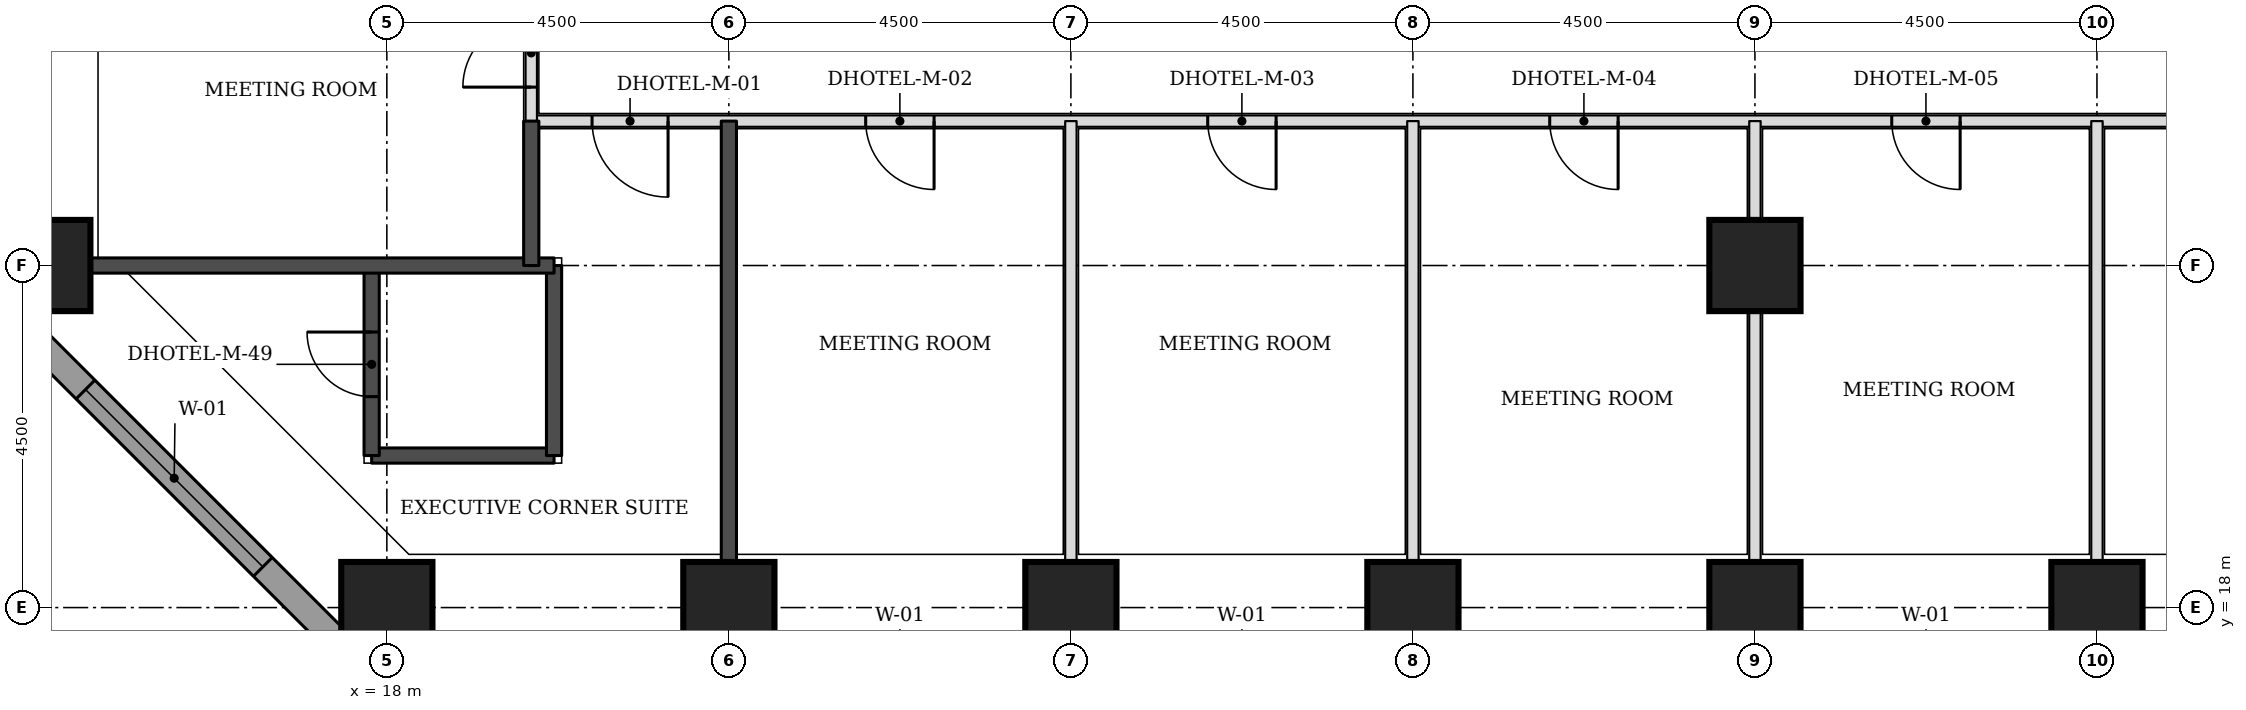
"""IFC4 building model, lengths in metres.
Left out: names, types, materials, properties, quantities, classifications, styles, units other than length and angle.
Written with IfcOpenShell. Run it as: python <this file> out.ifc"""

import sys

from ifc_helpers import new_model, si_unit, direction, frame, frame_2d, origin, origin_2d, place, context, subcontext, project, spatial, rectangle, extrude, element, fill, save


model = new_model("IFC4")
c1 = context("Model", 3, precision=1e-05, world=origin(), true_north=direction((0.0, 1.0)))
c2 = subcontext(c1, "Body", "Model", "MODEL_VIEW")
j1 = project(units=[si_unit("LENGTHUNIT", "METRE"), si_unit("PLANEANGLEUNIT", "RADIAN")], contexts=[c1])
p1 = place(None, origin())
s1 = spatial("IfcSite", under=j1, at=p1, CompositionType="ELEMENT")
p2 = place(p1, origin())
s2 = spatial("IfcBuilding", under=s1, at=p2, CompositionType="ELEMENT")
p3 = place(p2, frame((0.0, 0.0, 23.1)))
s3 = spatial("IfcBuildingStorey", under=s2, at=p3, CompositionType="ELEMENT", Elevation=23.1)
for number, where, z_axis, x_axis in (
    (1, (18.0, 18.0, 0.0), (0.0, 0.0, 1.0), (1.0, 0.0, 0.0)),
    (2, (22.5, 18.0, 0.0), (0.0, 0.0, 1.0), (1.0, 0.0, 0.0)),
    (3, (27.0, 18.0, 0.0), (0.0, 0.0, 1.0), (1.0, 0.0, 0.0)),
    (4, (31.5, 18.0, 0.0), (0.0, 0.0, 1.0), (1.0, 0.0, 0.0)),
    (5, (36.0, 18.0, 0.0), (0.0, 0.0, 1.0), (1.0, 0.0, 0.0)),
    (6, (40.5, 18.0, 0.0), (0.0, 0.0, 1.0), (1.0, 0.0, 0.0)),
    (7, (13.5, 22.5, 0.0), (0.0, 0.0, 1.0), (1.0, 0.0, 0.0)),
    (8, (36.0, 22.5, 0.0), (0.0, 0.0, 1.0), (1.0, 0.0, 0.0)),
):
    element("IfcColumn", number, at=place(p3, frame(where, z_axis=z_axis, x_axis=x_axis)), inside=s3, PredefinedType="COLUMN", context=c2, shape_type="SweptSolid", body=[
        extrude(rectangle(XDim=1.2, YDim=1.2, at=origin_2d()), origin(), (0.0, 0.0, 1.0), 3.3),
    ])
p4 = place(p3, frame((12.674, 22.23, 0.0), z_axis=(0.0, 0.0, 1.0), x_axis=(0.707106781187, -0.707106781187, 0.0)))
e9 = element("IfcWall", 9, at=p4, inside=s3, PredefinedType="STANDARD", context=c2, shape_type="SweptSolid", body=[
    extrude(rectangle(XDim=7.151, YDim=0.35, at=frame_2d((3.576, 0.0))), origin(), (0.0, 0.0, 1.0), 3.055),
])
p5 = place(p4, frame((1.926, 0.0, 0.8)))
e10 = element("IfcOpeningElement", 10, at=p5, cuts=e9, PredefinedType="OPENING", context=c2, shape_type="SweptSolid", body=[
    extrude(rectangle(XDim=3.3, YDim=1.5, at=frame_2d((1.65, 0.75))), frame((0.0, 0.185, 0.0), z_axis=(0.0, -1.0, 0.0), x_axis=(1.0, 0.0, 0.0)), (0.0, 0.0, 1.0), 0.37),
])
p6 = place(p3, frame((19.9, 24.4, 0.0), z_axis=(0.0, 0.0, 1.0), x_axis=(1.0, 0.0, 0.0)))
e11 = element("IfcWall", 11, at=p6, inside=s3, PredefinedType="PARTITIONING", context=c2, shape_type="SweptSolid", body=[
    extrude(rectangle(XDim=32.2, YDim=0.15, at=frame_2d((16.1, 0.0))), origin(), (0.0, 0.0, 1.0), 3.08),
])
p7 = place(p6, frame((4.4, 0.0, 0.0)))
e12 = element("IfcOpeningElement", 12, at=p7, cuts=e11, PredefinedType="OPENING", context=c2, shape_type="SweptSolid", body=[
    extrude(rectangle(XDim=0.9, YDim=2.1, at=frame_2d((0.45, 1.05))), frame((0.0, 0.085, 0.0), z_axis=(0.0, -1.0, 0.0), x_axis=(1.0, 0.0, 0.0)), (0.0, 0.0, 1.0), 0.17),
])
p8 = place(p6, frame((8.9, 0.0, 0.0)))
e13 = element("IfcOpeningElement", 13, at=p8, cuts=e11, PredefinedType="OPENING", context=c2, shape_type="SweptSolid", body=[
    extrude(rectangle(XDim=0.9, YDim=2.1, at=frame_2d((0.45, 1.05))), frame((0.0, 0.085, 0.0), z_axis=(0.0, -1.0, 0.0), x_axis=(1.0, 0.0, 0.0)), (0.0, 0.0, 1.0), 0.17),
])
p9 = place(p6, frame((13.4, 0.0, 0.0)))
e14 = element("IfcOpeningElement", 14, at=p9, cuts=e11, PredefinedType="OPENING", context=c2, shape_type="SweptSolid", body=[
    extrude(rectangle(XDim=0.9, YDim=2.1, at=frame_2d((0.45, 1.05))), frame((0.0, 0.085, 0.0), z_axis=(0.0, -1.0, 0.0), x_axis=(1.0, 0.0, 0.0)), (0.0, 0.0, 1.0), 0.17),
])
p10 = place(p6, frame((17.9, 0.0, 0.0)))
e15 = element("IfcOpeningElement", 15, at=p10, cuts=e11, PredefinedType="OPENING", context=c2, shape_type="SweptSolid", body=[
    extrude(rectangle(XDim=0.9, YDim=2.1, at=frame_2d((0.45, 1.05))), frame((0.0, 0.085, 0.0), z_axis=(0.0, -1.0, 0.0), x_axis=(1.0, 0.0, 0.0)), (0.0, 0.0, 1.0), 0.17),
])
p11 = place(p6, frame((22.4, 0.0, 0.0)))
e16 = element("IfcOpeningElement", 16, at=p11, cuts=e11, PredefinedType="OPENING", context=c2, shape_type="SweptSolid", body=[
    extrude(rectangle(XDim=0.9, YDim=2.1, at=frame_2d((0.45, 1.05))), frame((0.0, 0.085, 0.0), z_axis=(0.0, -1.0, 0.0), x_axis=(1.0, 0.0, 0.0)), (0.0, 0.0, 1.0), 0.17),
])
p12 = place(p6, frame((26.9, 0.0, 0.0)))
e17 = element("IfcOpeningElement", 17, at=p12, cuts=e11, PredefinedType="OPENING", context=c2, shape_type="SweptSolid", body=[
    extrude(rectangle(XDim=0.9, YDim=2.1, at=frame_2d((0.45, 1.05))), frame((0.0, 0.085, 0.0), z_axis=(0.0, -1.0, 0.0), x_axis=(1.0, 0.0, 0.0)), (0.0, 0.0, 1.0), 0.17),
])
p13 = place(p6, frame((0.8, 0.0, 0.0)))
e18 = element("IfcOpeningElement", 18, at=p13, cuts=e11, PredefinedType="OPENING", context=c2, shape_type="SweptSolid", body=[
    extrude(rectangle(XDim=1.0, YDim=2.1, at=frame_2d((0.5, 1.05))), frame((0.0, 0.085, 0.0), z_axis=(0.0, -1.0, 0.0), x_axis=(1.0, 0.0, 0.0)), (0.0, 0.0, 1.0), 0.17),
])
p14 = place(p6, frame((30.4, 0.0, 0.0)))
e19 = element("IfcOpeningElement", 19, at=p14, cuts=e11, PredefinedType="OPENING", context=c2, shape_type="SweptSolid", body=[
    extrude(rectangle(XDim=1.0, YDim=2.1, at=frame_2d((0.5, 1.05))), frame((0.0, 0.085, 0.0), z_axis=(0.0, -1.0, 0.0), x_axis=(1.0, 0.0, 0.0)), (0.0, 0.0, 1.0), 0.17),
])
p15 = place(p3, frame((19.9, 24.4, 0.0), z_axis=(0.0, 0.0, 1.0), x_axis=(0.0, 1.0, 0.0)))
e20 = element("IfcWall", 20, at=p15, inside=s3, PredefinedType="PARTITIONING", context=c2, shape_type="SweptSolid", body=[
    extrude(rectangle(XDim=25.1, YDim=0.15, at=frame_2d((12.55, 0.0))), origin(), (0.0, 0.0, 1.0), 3.08),
])
p16 = place(p15, frame((0.447, 0.0, 0.0)))
e21 = element("IfcOpeningElement", 21, at=p16, cuts=e20, PredefinedType="OPENING", context=c2, shape_type="SweptSolid", body=[
    extrude(rectangle(XDim=0.9, YDim=2.1, at=frame_2d((0.45, 1.05))), frame((0.0, 0.085, 0.0), z_axis=(0.0, -1.0, 0.0), x_axis=(1.0, 0.0, 0.0)), (0.0, 0.0, 1.0), 0.17),
])
p17 = place(p15, frame((4.4, 0.0, 0.0)))
e22 = element("IfcOpeningElement", 22, at=p17, cuts=e20, PredefinedType="OPENING", context=c2, shape_type="SweptSolid", body=[
    extrude(rectangle(XDim=0.9, YDim=2.1, at=frame_2d((0.45, 1.05))), frame((0.0, 0.085, 0.0), z_axis=(0.0, -1.0, 0.0), x_axis=(1.0, 0.0, 0.0)), (0.0, 0.0, 1.0), 0.17),
])
p18 = place(p15, frame((10.025, 0.0, 0.0)))
e23 = element("IfcOpeningElement", 23, at=p18, cuts=e20, PredefinedType="OPENING", context=c2, shape_type="SweptSolid", body=[
    extrude(rectangle(XDim=1.0, YDim=2.1, at=frame_2d((0.5, 1.05))), frame((0.0, 0.085, 0.0), z_axis=(0.0, -1.0, 0.0), x_axis=(1.0, 0.0, 0.0)), (0.0, 0.0, 1.0), 0.17),
])
p19 = place(p15, frame((12.425, 0.0, 0.0)))
e24 = element("IfcOpeningElement", 24, at=p19, cuts=e20, PredefinedType="OPENING", context=c2, shape_type="SweptSolid", body=[
    extrude(rectangle(XDim=1.0, YDim=2.1, at=frame_2d((0.5, 1.05))), frame((0.0, 0.085, 0.0), z_axis=(0.0, -1.0, 0.0), x_axis=(1.0, 0.0, 0.0)), (0.0, 0.0, 1.0), 0.17),
])
p20 = place(p15, frame((19.025, 0.0, 0.0)))
e25 = element("IfcOpeningElement", 25, at=p20, cuts=e20, PredefinedType="OPENING", context=c2, shape_type="SweptSolid", body=[
    extrude(rectangle(XDim=1.0, YDim=2.1, at=frame_2d((0.5, 1.05))), frame((0.0, 0.085, 0.0), z_axis=(0.0, -1.0, 0.0), x_axis=(1.0, 0.0, 0.0)), (0.0, 0.0, 1.0), 0.17),
])
p21 = place(p15, frame((21.425, 0.0, 0.0)))
e26 = element("IfcOpeningElement", 26, at=p21, cuts=e20, PredefinedType="OPENING", context=c2, shape_type="SweptSolid", body=[
    extrude(rectangle(XDim=1.0, YDim=2.1, at=frame_2d((0.5, 1.05))), frame((0.0, 0.085, 0.0), z_axis=(0.0, -1.0, 0.0), x_axis=(1.0, 0.0, 0.0)), (0.0, 0.0, 1.0), 0.17),
])
p22 = place(p3, frame((22.5, 18.6, 0.0), z_axis=(0.0, 0.0, 1.0), x_axis=(0.0, 1.0, 0.0)))
e27 = element("IfcWall", 27, at=p22, inside=s3, PredefinedType="SOLIDWALL", context=c2, shape_type="SweptSolid", body=[
    extrude(rectangle(XDim=5.8, YDim=0.2, at=frame_2d((2.9, 0.0))), origin(), (0.0, 0.0, 1.0), 3.08),
])
p23 = place(p3, frame((17.8, 20.0, 0.0), z_axis=(0.0, 0.0, 1.0), x_axis=(1.0, 0.0, 0.0)))
e28 = element("IfcWall", 28, at=p23, inside=s3, PredefinedType="SOLIDWALL", context=c2, shape_type="SweptSolid", body=[
    extrude(rectangle(XDim=2.4, YDim=0.2, at=frame_2d((1.2, 0.0))), origin(), (0.0, 0.0, 1.0), 3.08),
])
p24 = place(p3, frame((17.8, 20.0, 0.0), z_axis=(0.0, 0.0, 1.0), x_axis=(0.0, 1.0, 0.0)))
e29 = element("IfcWall", 29, at=p24, inside=s3, PredefinedType="SOLIDWALL", context=c2, shape_type="SweptSolid", body=[
    extrude(rectangle(XDim=2.5, YDim=0.2, at=frame_2d((1.25, 0.0))), origin(), (0.0, 0.0, 1.0), 3.08),
])
p25 = place(p24, frame((0.775, 0.0, 0.0)))
e30 = element("IfcOpeningElement", 30, at=p25, cuts=e29, PredefinedType="OPENING", context=c2, shape_type="SweptSolid", body=[
    extrude(rectangle(XDim=0.85, YDim=2.1, at=frame_2d((0.425, 1.05))), frame((0.0, 0.11, 0.0), z_axis=(0.0, -1.0, 0.0), x_axis=(1.0, 0.0, 0.0)), (0.0, 0.0, 1.0), 0.22),
])
p26 = place(p3, frame((20.2, 20.0, 0.0), z_axis=(0.0, 0.0, 1.0), x_axis=(0.0, 1.0, 0.0)))
e31 = element("IfcWall", 31, at=p26, inside=s3, PredefinedType="SOLIDWALL", context=c2, shape_type="SweptSolid", body=[
    extrude(rectangle(XDim=2.5, YDim=0.2, at=frame_2d((1.25, 0.0))), origin(), (0.0, 0.0, 1.0), 3.08),
])
p27 = place(p3, frame((14.1, 22.5, 0.0), z_axis=(0.0, 0.0, 1.0), x_axis=(1.0, 0.0, 0.0)))
e32 = element("IfcWall", 32, at=p27, inside=s3, PredefinedType="SOLIDWALL", context=c2, shape_type="SweptSolid", body=[
    extrude(rectangle(XDim=6.1, YDim=0.2, at=frame_2d((3.05, 0.0))), origin(), (0.0, 0.0, 1.0), 3.08),
])
p28 = place(p3, frame((19.9, 22.5, 0.0), z_axis=(0.0, 0.0, 1.0), x_axis=(0.0, 1.0, 0.0)))
e33 = element("IfcWall", 33, at=p28, inside=s3, PredefinedType="SOLIDWALL", context=c2, shape_type="SweptSolid", body=[
    extrude(rectangle(XDim=1.9, YDim=0.2, at=frame_2d((0.95, 0.0))), origin(), (0.0, 0.0, 1.0), 3.08),
])
for number, where, z_axis, x_axis in (
    (34, (27.0, 18.6, 0.0), (0.0, 0.0, 1.0), (0.0, 1.0, 0.0)),
    (35, (31.5, 18.6, 0.0), (0.0, 0.0, 1.0), (0.0, 1.0, 0.0)),
):
    element("IfcWall", number, at=place(p3, frame(where, z_axis=z_axis, x_axis=x_axis)), inside=s3, PredefinedType="PARTITIONING", context=c2, shape_type="SweptSolid", body=[
        extrude(rectangle(XDim=5.8, YDim=0.15, at=frame_2d((2.9, 0.0))), origin(), (0.0, 0.0, 1.0), 3.08),
    ])
p29 = place(p3, frame((36.0, 18.6, 0.0), z_axis=(0.0, 0.0, 1.0), x_axis=(0.0, 1.0, 0.0)))
e36 = element("IfcWall", 36, at=p29, inside=s3, PredefinedType="PARTITIONING", context=c2, shape_type="SweptSolid", body=[
    extrude(rectangle(XDim=5.8, YDim=0.15, at=frame_2d((2.9, 0.0))), origin(), (0.0, 0.0, 1.0), 2.33),
])
p30 = place(p3, frame((40.5, 18.6, 0.0), z_axis=(0.0, 0.0, 1.0), x_axis=(0.0, 1.0, 0.0)))
e37 = element("IfcWall", 37, at=p30, inside=s3, PredefinedType="PARTITIONING", context=c2, shape_type="SweptSolid", body=[
    extrude(rectangle(XDim=5.8, YDim=0.15, at=frame_2d((2.9, 0.0))), origin(), (0.0, 0.0, 1.0), 3.08),
])
p31 = place(p5, origin())
e38 = element("IfcWindow", 38, at=p31, inside=s3, PartitioningType="SINGLE_PANEL", PredefinedType="WINDOW", context=c2, shape_type="SweptSolid", body=[
    extrude(rectangle(XDim=3.3, YDim=1.5, at=frame_2d((1.65, 0.75))), frame((0.0, 0.085, 0.0), z_axis=(0.0, -1.0, 0.0), x_axis=(1.0, 0.0, 0.0)), (0.0, 0.0, 1.0), 0.06),
])
fill(e10, e38)
p32 = place(p7, frame((0.9, 0.0, 0.0), z_axis=(0.0, 0.0, 1.0), x_axis=(-1.0, 0.0, 0.0)))
e39 = element("IfcDoor", 39, at=p32, inside=s3, OperationType="SINGLE_SWING_LEFT", PredefinedType="DOOR", context=c2, shape_type="SweptSolid", body=[
    extrude(rectangle(XDim=0.9, YDim=2.1, at=frame_2d((0.45, 1.05))), frame((0.0, 0.025, 0.0), z_axis=(0.0, -1.0, 0.0), x_axis=(1.0, 0.0, 0.0)), (0.0, 0.0, 1.0), 0.05),
])
fill(e12, e39)
p33 = place(p8, frame((0.9, 0.0, 0.0), z_axis=(0.0, 0.0, 1.0), x_axis=(-1.0, 0.0, 0.0)))
e40 = element("IfcDoor", 40, at=p33, inside=s3, OperationType="SINGLE_SWING_LEFT", PredefinedType="DOOR", context=c2, shape_type="SweptSolid", body=[
    extrude(rectangle(XDim=0.9, YDim=2.1, at=frame_2d((0.45, 1.05))), frame((0.0, 0.025, 0.0), z_axis=(0.0, -1.0, 0.0), x_axis=(1.0, 0.0, 0.0)), (0.0, 0.0, 1.0), 0.05),
])
fill(e13, e40)
p34 = place(p9, frame((0.9, 0.0, 0.0), z_axis=(0.0, 0.0, 1.0), x_axis=(-1.0, 0.0, 0.0)))
e41 = element("IfcDoor", 41, at=p34, inside=s3, OperationType="SINGLE_SWING_LEFT", PredefinedType="DOOR", context=c2, shape_type="SweptSolid", body=[
    extrude(rectangle(XDim=0.9, YDim=2.1, at=frame_2d((0.45, 1.05))), frame((0.0, 0.025, 0.0), z_axis=(0.0, -1.0, 0.0), x_axis=(1.0, 0.0, 0.0)), (0.0, 0.0, 1.0), 0.05),
])
fill(e14, e41)
p35 = place(p10, frame((0.9, 0.0, 0.0), z_axis=(0.0, 0.0, 1.0), x_axis=(-1.0, 0.0, 0.0)))
e42 = element("IfcDoor", 42, at=p35, inside=s3, OperationType="SINGLE_SWING_LEFT", PredefinedType="DOOR", context=c2, shape_type="SweptSolid", body=[
    extrude(rectangle(XDim=0.9, YDim=2.1, at=frame_2d((0.45, 1.05))), frame((0.0, 0.025, 0.0), z_axis=(0.0, -1.0, 0.0), x_axis=(1.0, 0.0, 0.0)), (0.0, 0.0, 1.0), 0.05),
])
fill(e15, e42)
p36 = place(p16, origin())
e43 = element("IfcDoor", 43, at=p36, inside=s3, OperationType="SINGLE_SWING_LEFT", PredefinedType="DOOR", context=c2, shape_type="SweptSolid", body=[
    extrude(rectangle(XDim=0.9, YDim=2.1, at=frame_2d((0.45, 1.05))), frame((0.0, 0.025, 0.0), z_axis=(0.0, -1.0, 0.0), x_axis=(1.0, 0.0, 0.0)), (0.0, 0.0, 1.0), 0.05),
])
fill(e21, e43)
p37 = place(p13, frame((1.0, 0.0, 0.0), z_axis=(0.0, 0.0, 1.0), x_axis=(-1.0, 0.0, 0.0)))
e44 = element("IfcDoor", 44, at=p37, inside=s3, OperationType="SINGLE_SWING_LEFT", PredefinedType="DOOR", context=c2, shape_type="SweptSolid", body=[
    extrude(rectangle(XDim=1.0, YDim=2.1, at=frame_2d((0.5, 1.05))), frame((0.0, 0.025, 0.0), z_axis=(0.0, -1.0, 0.0), x_axis=(1.0, 0.0, 0.0)), (0.0, 0.0, 1.0), 0.05),
])
fill(e18, e44)
p38 = place(p25, origin())
e45 = element("IfcDoor", 45, at=p38, inside=s3, OperationType="SINGLE_SWING_RIGHT", PredefinedType="DOOR", context=c2, shape_type="SweptSolid", body=[
    extrude(rectangle(XDim=0.85, YDim=2.1, at=frame_2d((0.425, 1.05))), frame((0.0, 0.025, 0.0), z_axis=(0.0, -1.0, 0.0), x_axis=(1.0, 0.0, 0.0)), (0.0, 0.0, 1.0), 0.05),
])
fill(e30, e45)
save(model, sys.argv[1])
